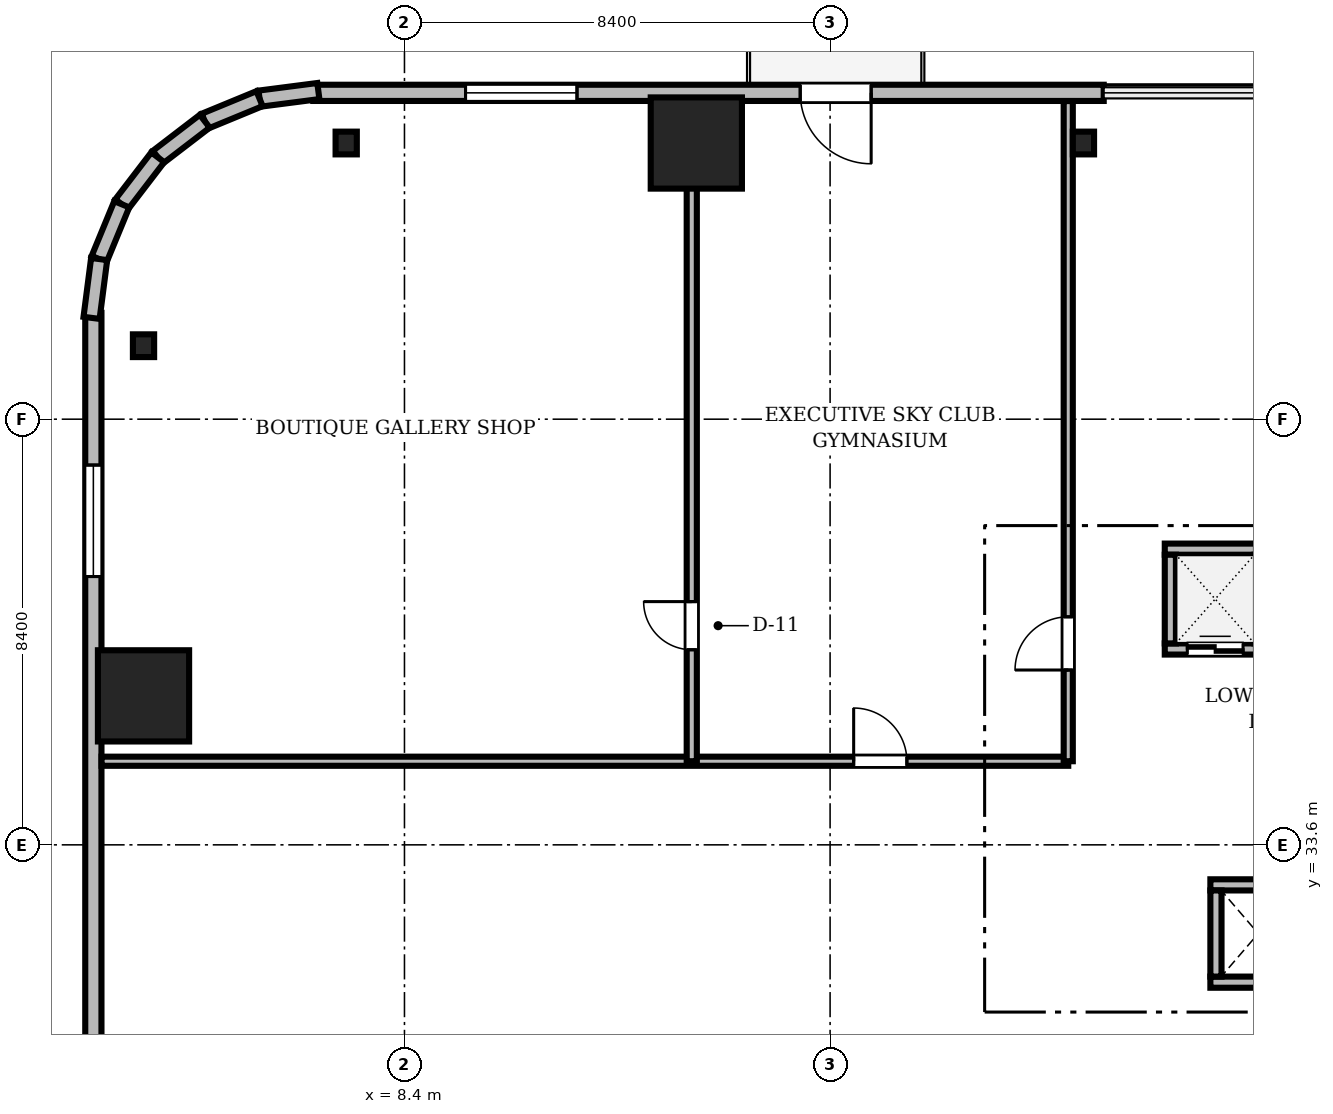
"""IFC4 building model, lengths in metres.
Left out: names, types, materials, properties, quantities, classifications, styles, units other than length and angle.
Written with IfcOpenShell. Run it as: python <this file> out.ifc"""

import sys

from ifc_helpers import new_model, si_unit, direction, frame, frame_2d, origin, origin_2d, place, context, subcontext, project, spatial, rectangle, i_section, extrude, source, transform, mapped, element, fill, save


model = new_model("IFC4")
c1 = context("Model", 3, precision=1e-05, world=origin(), true_north=direction((0.0, 1.0)))
c2 = subcontext(c1, "Body", "Model", "MODEL_VIEW")
j1 = project(units=[si_unit("LENGTHUNIT", "METRE"), si_unit("PLANEANGLEUNIT", "RADIAN")], contexts=[c1])
p1 = place(None, origin())
s1 = spatial("IfcSite", under=j1, at=p1, CompositionType="ELEMENT")
p2 = place(p1, origin())
s2 = spatial("IfcBuilding", under=s1, at=p2, CompositionType="ELEMENT")
p3 = place(p2, frame((0.0, 0.0, 75.05)))
s3 = spatial("IfcBuildingStorey", under=s2, at=p3, CompositionType="ELEMENT", Elevation=75.05)
m1 = source(origin(), c2, "Body", "SweptSolid", [
    extrude(rectangle(XDim=1.8, YDim=1.8, at=origin_2d()), origin(), (0.0, 0.0, 1.0), 3.41),
])
for number, where, z_axis, x_axis in (
    (1, (14.16, 47.45, 0.0), (0.0, 0.0, 1.0), (1.0, 0.0, 0.0)),
    (2, (3.25, 36.54, 0.0), (0.0, 0.0, 1.0), (1.0, 0.0, 0.0)),
):
    element("IfcColumn", number, at=place(p3, frame(where, z_axis=z_axis, x_axis=x_axis)), inside=s3, PredefinedType="COLUMN", context=c2, shape_type="MappedRepresentation", body=[
        mapped(m1, transform((0.0, 0.0, 0.0), scale=1.0)),
    ])
m2 = source(origin(), c2, "Body", "SweptSolid", [
    extrude(i_section(OverallWidth=0.419, OverallDepth=0.449, WebThickness=0.031, FlangeThickness=0.048, FilletRadius=0.015, at=origin_2d()), origin(), (0.0, 0.0, 1.0), 3.41),
])
for number, where, z_axis, x_axis in (
    (3, (21.8, 47.45, 0.0), (0.0, 0.0, 1.0), (1.0, 0.0, 0.0)),
    (4, (7.25, 47.45, 0.0), (0.0, 0.0, 1.0), (1.0, 0.0, 0.0)),
    (5, (3.25, 43.45, 0.0), (0.0, 0.0, 1.0), (1.0, 0.0, 0.0)),
):
    element("IfcColumn", number, at=place(p3, frame(where, z_axis=z_axis, x_axis=x_axis)), inside=s3, PredefinedType="COLUMN", context=c2, shape_type="MappedRepresentation", body=[
        mapped(m2, transform((0.0, 0.0, 0.0), scale=1.0)),
    ])
m3 = source(origin(), c2, "Body", "SweptSolid", [
    extrude(rectangle(XDim=15.6, YDim=0.32, at=frame_2d((7.8, 0.0))), origin(), (0.0, 0.0, 1.0), 3.41),
])
p4 = place(p3, frame((22.2, 48.44, 0.0), z_axis=(0.0, 0.0, 1.0), x_axis=(-1.0, 0.0, 0.0)))
e6 = element("IfcWall", 6, at=p4, inside=s3, PredefinedType="SOLIDWALL", context=c2, shape_type="MappedRepresentation", body=[
    mapped(m3, transform((0.0, 0.0, 0.0), scale=1.0)),
])
m4 = source(origin(), c2, "Body", "SweptSolid", [
    extrude(rectangle(XDim=1.4, YDim=2.3, at=frame_2d((0.7, 1.15))), frame((0.0, 0.17, 0.0), z_axis=(0.0, -1.0, 0.0), x_axis=(1.0, 0.0, 0.0)), (0.0, 0.0, 1.0), 0.34),
])
p5 = place(p4, frame((4.59, 0.0, 0.0)))
e7 = element("IfcOpeningElement", 7, at=p5, cuts=e6, PredefinedType="OPENING", context=c2, shape_type="MappedRepresentation", body=[
    mapped(m4, transform((0.0, 0.0, 0.0), scale=1.0)),
])
m5 = source(origin(), c2, "Body", "SweptSolid", [
    extrude(rectangle(XDim=2.2, YDim=2.4, at=frame_2d((1.1, 1.2))), frame((0.0, 0.17, 0.0), z_axis=(0.0, -1.0, 0.0), x_axis=(1.0, 0.0, 0.0)), (0.0, 0.0, 1.0), 0.34),
])
p6 = place(p4, frame((10.395, 0.0, 0.72)))
e8 = element("IfcOpeningElement", 8, at=p6, cuts=e6, PredefinedType="OPENING", context=c2, shape_type="MappedRepresentation", body=[
    mapped(m5, transform((0.0, 0.0, 0.0), scale=1.0)),
])
m6 = source(origin(), c2, "Body", "SweptSolid", [
    extrude(rectangle(XDim=15.6, YDim=0.32, at=frame_2d((7.8, 0.0))), origin(), (0.0, 0.0, 1.0), 3.41),
])
p7 = place(p3, frame((2.26, 44.1, 0.0), z_axis=(0.0, 0.0, 1.0), x_axis=(0.0, -1.0, 0.0)))
e9 = element("IfcWall", 9, at=p7, inside=s3, PredefinedType="SOLIDWALL", context=c2, shape_type="MappedRepresentation", body=[
    mapped(m6, transform((0.0, 0.0, 0.0), scale=1.0)),
])
p8 = place(p7, frame((3.005, 0.0, 0.72)))
e10 = element("IfcOpeningElement", 10, at=p8, cuts=e9, PredefinedType="OPENING", context=c2, shape_type="MappedRepresentation", body=[
    mapped(m5, transform((0.0, 0.0, 0.0), scale=1.0)),
])
m7 = source(origin(), c2, "Body", "SweptSolid", [
    extrude(rectangle(XDim=1.17, YDim=0.32, at=frame_2d((0.585, 0.0))), origin(), (0.0, 0.0, 1.0), 3.41),
])
p9 = place(p3, frame((6.7, 48.476, 0.0), z_axis=(0.0, 0.0, 1.0), x_axis=(-0.991735963317, -0.128295670475, 0.0)))
e11 = element("IfcWall", 11, at=p9, inside=s3, PredefinedType="SOLIDWALL", context=c2, shape_type="MappedRepresentation", body=[
    mapped(m7, transform((0.0, 0.0, 0.0), scale=1.0)),
])
m8 = source(origin(), c2, "Body", "SweptSolid", [
    extrude(rectangle(XDim=1.169, YDim=0.32, at=frame_2d((0.584, 0.0))), origin(), (0.0, 0.0, 1.0), 3.41),
])
p10 = place(p3, frame((5.54, 48.325, 0.0), z_axis=(0.0, 0.0, 1.0), x_axis=(-0.924552646638, -0.381054331552, 0.0)))
e12 = element("IfcWall", 12, at=p10, inside=s3, PredefinedType="SOLIDWALL", context=c2, shape_type="MappedRepresentation", body=[
    mapped(m8, transform((0.0, 0.0, 0.0), scale=1.0)),
])
m9 = source(origin(), c2, "Body", "SweptSolid", [
    extrude(rectangle(XDim=1.169, YDim=0.32, at=frame_2d((0.584, 0.0))), origin(), (0.0, 0.0, 1.0), 3.41),
])
p11 = place(p3, frame((4.459, 47.88, 0.0), z_axis=(0.0, 0.0, 1.0), x_axis=(-0.793663520347, -0.608356981114, 0.0)))
e13 = element("IfcWall", 13, at=p11, inside=s3, PredefinedType="SOLIDWALL", context=c2, shape_type="MappedRepresentation", body=[
    mapped(m9, transform((0.0, 0.0, 0.0), scale=1.0)),
])
m10 = source(origin(), c2, "Body", "SweptSolid", [
    extrude(rectangle(XDim=1.169, YDim=0.32, at=frame_2d((0.584, 0.0))), origin(), (0.0, 0.0, 1.0), 3.41),
])
p12 = place(p3, frame((3.531, 47.169, 0.0), z_axis=(0.0, 0.0, 1.0), x_axis=(-0.608387696831, -0.793639975269, 0.0)))
e14 = element("IfcWall", 14, at=p12, inside=s3, PredefinedType="SOLIDWALL", context=c2, shape_type="MappedRepresentation", body=[
    mapped(m10, transform((0.0, 0.0, 0.0), scale=1.0)),
])
p13 = place(p3, frame((2.82, 46.241, 0.0), z_axis=(0.0, 0.0, 1.0), x_axis=(-0.381054331552, -0.924552646638, 0.0)))
e15 = element("IfcWall", 15, at=p13, inside=s3, PredefinedType="SOLIDWALL", context=c2, shape_type="MappedRepresentation", body=[
    mapped(m8, transform((0.0, 0.0, 0.0), scale=1.0)),
])
p14 = place(p3, frame((2.375, 45.16, 0.0), z_axis=(0.0, 0.0, 1.0), x_axis=(-0.128295670475, -0.991735963317, 0.0)))
e16 = element("IfcWall", 16, at=p14, inside=s3, PredefinedType="SOLIDWALL", context=c2, shape_type="MappedRepresentation", body=[
    mapped(m7, transform((0.0, 0.0, 0.0), scale=1.0)),
])
m11 = source(origin(), c2, "Body", "SweptSolid", [
    extrude(rectangle(XDim=1.99, YDim=0.22, at=frame_2d((0.995, 0.0))), origin(), (0.0, 0.0, 1.0), 3.41),
])
p15 = place(p3, frame((23.405, 37.465, 0.0), z_axis=(0.0, 0.0, 1.0), x_axis=(1.0, 0.0, 0.0)))
e17 = element("IfcWall", 17, at=p15, inside=s3, PredefinedType="SOLIDWALL", context=c2, shape_type="MappedRepresentation", body=[
    mapped(m11, transform((0.0, 0.0, 0.0), scale=1.0)),
])
m12 = source(origin(), c2, "Body", "SweptSolid", [
    extrude(rectangle(XDim=1.1, YDim=2.2, at=frame_2d((0.55, 1.1))), frame((0.0, 0.12, 0.0), z_axis=(0.0, -1.0, 0.0), x_axis=(1.0, 0.0, 0.0)), (0.0, 0.0, 1.0), 0.24),
])
p16 = place(p15, frame((0.445, 0.0, 0.0)))
e18 = element("IfcOpeningElement", 18, at=p16, cuts=e17, PredefinedType="OPENING", context=c2, shape_type="MappedRepresentation", body=[
    mapped(m12, transform((0.0, 0.0, 0.0), scale=1.0)),
])
p17 = place(p3, frame((23.405, 39.435, 0.0), z_axis=(0.0, 0.0, 1.0), x_axis=(1.0, 0.0, 0.0)))
e19 = element("IfcWall", 19, at=p17, inside=s3, PredefinedType="SOLIDWALL", context=c2, shape_type="MappedRepresentation", body=[
    mapped(m11, transform((0.0, 0.0, 0.0), scale=1.0)),
])
m13 = source(origin(), c2, "Body", "SweptSolid", [
    extrude(rectangle(XDim=1.75, YDim=0.22, at=frame_2d((0.875, 0.0))), origin(), (0.0, 0.0, 1.0), 3.41),
])
p18 = place(p3, frame((23.515, 37.575, 0.0), z_axis=(0.0, 0.0, 1.0), x_axis=(0.0, 1.0, 0.0)))
e20 = element("IfcWall", 20, at=p18, inside=s3, PredefinedType="SOLIDWALL", context=c2, shape_type="MappedRepresentation", body=[
    mapped(m13, transform((0.0, 0.0, 0.0), scale=1.0)),
])
m14 = source(origin(), c2, "Body", "SweptSolid", [
    extrude(rectangle(XDim=1.89, YDim=0.22, at=frame_2d((0.945, 0.0))), origin(), (0.0, 0.0, 1.0), 3.41),
])
for number, where, z_axis, x_axis in (
    (21, (24.305, 30.89, 0.0), (0.0, 0.0, 1.0), (1.0, 0.0, 0.0)),
    (22, (24.305, 32.81, 0.0), (0.0, 0.0, 1.0), (1.0, 0.0, 0.0)),
):
    element("IfcWall", number, at=place(p3, frame(where, z_axis=z_axis, x_axis=x_axis)), inside=s3, PredefinedType="SOLIDWALL", context=c2, shape_type="MappedRepresentation", body=[
        mapped(m14, transform((0.0, 0.0, 0.0), scale=1.0)),
    ])
m15 = source(origin(), c2, "Body", "SweptSolid", [
    extrude(rectangle(XDim=1.7, YDim=0.22, at=frame_2d((0.85, 0.0))), origin(), (0.0, 0.0, 1.0), 3.41),
])
p19 = place(p3, frame((24.415, 31.0, 0.0), z_axis=(0.0, 0.0, 1.0), x_axis=(0.0, 1.0, 0.0)))
e23 = element("IfcWall", 23, at=p19, inside=s3, PredefinedType="SOLIDWALL", context=c2, shape_type="MappedRepresentation", body=[
    mapped(m15, transform((0.0, 0.0, 0.0), scale=1.0)),
])
m16 = source(origin(), c2, "Body", "SweptSolid", [
    extrude(rectangle(XDim=19.078, YDim=0.18, at=frame_2d((9.539, 0.0))), origin(), (0.0, 0.0, 1.0), 2.652),
])
p20 = place(p3, frame((2.422, 35.25, 0.0), z_axis=(0.0, 0.0, 1.0), x_axis=(1.0, 0.0, 0.0)))
e24 = element("IfcWall", 24, at=p20, inside=s3, PredefinedType="PARTITIONING", context=c2, shape_type="MappedRepresentation", body=[
    mapped(m16, transform((0.0, 0.0, 0.0), scale=1.0)),
])
m17 = source(origin(), c2, "Body", "SweptSolid", [
    extrude(rectangle(XDim=1.05, YDim=2.2, at=frame_2d((0.525, 1.1))), frame((0.0, 0.1, 0.0), z_axis=(0.0, -1.0, 0.0), x_axis=(1.0, 0.0, 0.0)), (0.0, 0.0, 1.0), 0.2),
])
p21 = place(p20, frame((14.843, 0.0, 0.0)))
e25 = element("IfcOpeningElement", 25, at=p21, cuts=e24, PredefinedType="OPENING", context=c2, shape_type="MappedRepresentation", body=[
    mapped(m17, transform((0.0, 0.0, 0.0), scale=1.0)),
])
m18 = source(origin(), c2, "Body", "SweptSolid", [
    extrude(rectangle(XDim=13.028, YDim=0.2, at=frame_2d((6.514, 0.0))), origin(), (0.0, 0.0, 1.0), 2.652),
])
p22 = place(p3, frame((14.07, 35.25, 0.0), z_axis=(0.0, 0.0, 1.0), x_axis=(0.0, 1.0, 0.0)))
e26 = element("IfcWall", 26, at=p22, inside=s3, PredefinedType="PARTITIONING", context=c2, shape_type="MappedRepresentation", body=[
    mapped(m18, transform((0.0, 0.0, 0.0), scale=1.0)),
])
m19 = source(origin(), c2, "Body", "SweptSolid", [
    extrude(rectangle(XDim=0.95, YDim=2.15, at=frame_2d((0.475, 1.075))), frame((0.0, 0.11, 0.0), z_axis=(0.0, -1.0, 0.0), x_axis=(1.0, 0.0, 0.0)), (0.0, 0.0, 1.0), 0.22),
])
p23 = place(p22, frame((2.2, 0.0, 0.0)))
e27 = element("IfcOpeningElement", 27, at=p23, cuts=e26, PredefinedType="OPENING", context=c2, shape_type="MappedRepresentation", body=[
    mapped(m19, transform((0.0, 0.0, 0.0), scale=1.0)),
])
m20 = source(origin(), c2, "Body", "SweptSolid", [
    extrude(rectangle(XDim=13.028, YDim=0.18, at=frame_2d((6.514, 0.0))), origin(), (0.0, 0.0, 1.0), 2.652),
])
p24 = place(p3, frame((21.5, 35.25, 0.0), z_axis=(0.0, 0.0, 1.0), x_axis=(0.0, 1.0, 0.0)))
e28 = element("IfcWall", 28, at=p24, inside=s3, PredefinedType="PARTITIONING", context=c2, shape_type="MappedRepresentation", body=[
    mapped(m20, transform((0.0, 0.0, 0.0), scale=1.0)),
])
p25 = place(p24, frame((1.8, 0.0, 0.0)))
e29 = element("IfcOpeningElement", 29, at=p25, cuts=e28, PredefinedType="OPENING", context=c2, shape_type="MappedRepresentation", body=[
    mapped(m17, transform((0.0, 0.0, 0.0), scale=1.0)),
])
m21 = source(origin(), c2, "Body", "SweptSolid", [
    extrude(rectangle(XDim=1.4, YDim=2.3, at=frame_2d((0.7, 1.15))), frame((0.0, 0.025, 0.0), z_axis=(0.0, -1.0, 0.0), x_axis=(1.0, 0.0, 0.0)), (0.0, 0.0, 1.0), 0.05),
])
p26 = place(p5, frame((1.4, 0.0, 0.0), z_axis=(0.0, 0.0, 1.0), x_axis=(-1.0, 0.0, 0.0)))
e30 = element("IfcDoor", 30, at=p26, inside=s3, OperationType="DOUBLE_DOOR_SLIDING", PredefinedType="DOOR", context=c2, shape_type="MappedRepresentation", body=[
    mapped(m21, transform((0.0, 0.0, 0.0), scale=1.0)),
])
fill(e7, e30)
m22 = source(origin(), c2, "Body", "SweptSolid", [
    extrude(rectangle(XDim=2.2, YDim=2.4, at=frame_2d((1.1, 1.2))), frame((0.0, 0.03, 0.0), z_axis=(0.0, -1.0, 0.0), x_axis=(1.0, 0.0, 0.0)), (0.0, 0.0, 1.0), 0.06),
])
p27 = place(p6, origin())
e31 = element("IfcWindow", 31, at=p27, inside=s3, PartitioningType="SINGLE_PANEL", PredefinedType="WINDOW", context=c2, shape_type="MappedRepresentation", body=[
    mapped(m22, transform((0.0, 0.0, 0.0), scale=1.0)),
])
fill(e8, e31)
p28 = place(p8, origin())
e32 = element("IfcWindow", 32, at=p28, inside=s3, PartitioningType="SINGLE_PANEL", PredefinedType="WINDOW", context=c2, shape_type="MappedRepresentation", body=[
    mapped(m22, transform((0.0, 0.0, 0.0), scale=1.0)),
])
fill(e10, e32)
m23 = source(origin(), c2, "Body", "SweptSolid", [
    extrude(rectangle(XDim=1.1, YDim=2.2, at=frame_2d((0.55, 1.1))), frame((0.0, 0.025, 0.0), z_axis=(0.0, -1.0, 0.0), x_axis=(1.0, 0.0, 0.0)), (0.0, 0.0, 1.0), 0.05),
])
p29 = place(p16, origin())
e33 = element("IfcDoor", 33, at=p29, inside=s3, OperationType="DOUBLE_DOOR_SLIDING", PredefinedType="DOOR", context=c2, shape_type="MappedRepresentation", body=[
    mapped(m23, transform((0.0, 0.0, 0.0), scale=1.0)),
])
fill(e18, e33)
m24 = source(origin(), c2, "Body", "SweptSolid", [
    extrude(rectangle(XDim=1.05, YDim=2.2, at=frame_2d((0.525, 1.1))), frame((0.0, 0.025, 0.0), z_axis=(0.0, -1.0, 0.0), x_axis=(1.0, 0.0, 0.0)), (0.0, 0.0, 1.0), 0.05),
])
p30 = place(p21, origin())
e34 = element("IfcDoor", 34, at=p30, inside=s3, OperationType="SINGLE_SWING_LEFT", PredefinedType="DOOR", context=c2, shape_type="MappedRepresentation", body=[
    mapped(m24, transform((0.0, 0.0, 0.0), scale=1.0)),
])
fill(e25, e34)
m25 = source(origin(), c2, "Body", "SweptSolid", [
    extrude(rectangle(XDim=0.95, YDim=2.15, at=frame_2d((0.475, 1.075))), frame((0.0, 0.025, 0.0), z_axis=(0.0, -1.0, 0.0), x_axis=(1.0, 0.0, 0.0)), (0.0, 0.0, 1.0), 0.05),
])
p31 = place(p23, origin())
e35 = element("IfcDoor", 35, at=p31, inside=s3, OperationType="SINGLE_SWING_RIGHT", PredefinedType="DOOR", context=c2, shape_type="MappedRepresentation", body=[
    mapped(m25, transform((0.0, 0.0, 0.0), scale=1.0)),
])
fill(e27, e35)
p32 = place(p25, origin())
e36 = element("IfcDoor", 36, at=p32, inside=s3, OperationType="SINGLE_SWING_LEFT", PredefinedType="DOOR", context=c2, shape_type="MappedRepresentation", body=[
    mapped(m24, transform((0.0, 0.0, 0.0), scale=1.0)),
])
fill(e29, e36)
save(model, sys.argv[1])
